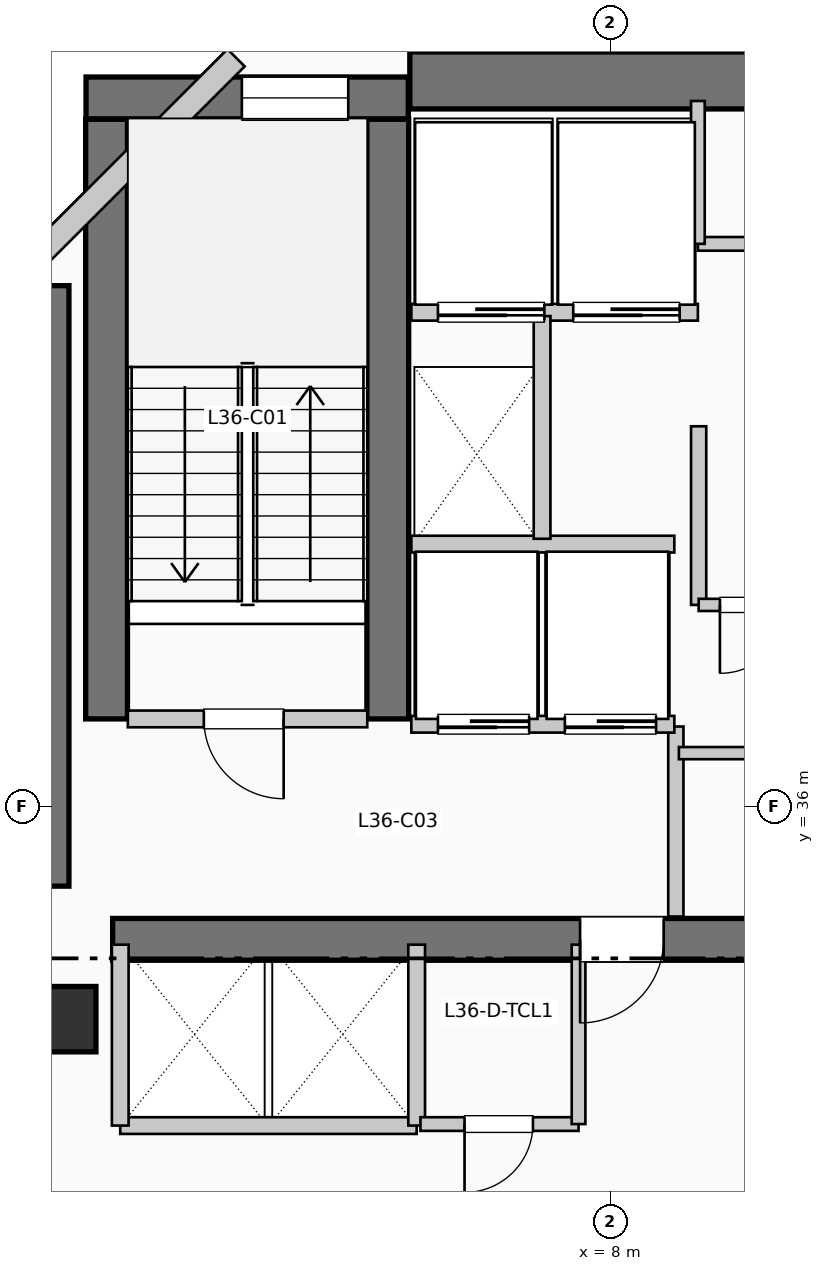
"""IFC4 building model, lengths in metres.
Left out: names, types, materials, properties, quantities, classifications, styles, units other than length and angle.
Written with IfcOpenShell. Run it as: python <this file> out.ifc"""

import sys

from ifc_helpers import new_model, si_unit, direction, frame, frame_2d, origin, origin_2d, place, context, subcontext, project, spatial, rectangle, extrude, element, fill, save


model = new_model("IFC4")
c1 = context("Model", 3, precision=1e-05, world=origin(), true_north=direction((0.0, 1.0)))
c2 = subcontext(c1, "Body", "Model", "MODEL_VIEW")
j1 = project(units=[si_unit("LENGTHUNIT", "METRE"), si_unit("PLANEANGLEUNIT", "RADIAN")], contexts=[c1])
p1 = place(None, origin())
s1 = spatial("IfcSite", under=j1, at=p1, CompositionType="ELEMENT")
p2 = place(p1, origin())
s2 = spatial("IfcBuilding", under=s1, at=p2, CompositionType="ELEMENT")
p3 = place(p2, frame((0.0, 0.0, 150.81)))
s3 = spatial("IfcBuildingStorey", under=s2, at=p3, CompositionType="ELEMENT", Elevation=150.81)
p4 = place(p3, frame((5.36, 45.55, 0.0), z_axis=(0.0, 0.0, 1.0), x_axis=(1.0, 0.0, 0.0)))
e1 = element("IfcWall", 1, at=p4, inside=s3, PredefinedType="SHEAR", context=c2, shape_type="SweptSolid", body=[
    extrude(rectangle(XDim=13.98, YDim=0.75, at=frame_2d((6.99, 0.0))), origin(), (0.0, 0.0, 1.0), 3.96),
])
p5 = place(p3, frame((0.5, 34.95, 0.0), z_axis=(0.0, 0.0, 1.0), x_axis=(0.0, 1.0, 0.0)))
e2 = element("IfcWall", 2, at=p5, inside=s3, PredefinedType="SHEAR", context=c2, shape_type="SweptSolid", body=[
    extrude(rectangle(XDim=7.9, YDim=0.75, at=frame_2d((3.95, 0.0))), origin(), (0.0, 0.0, 1.0), 3.96),
])
p6 = place(p3, frame((1.45, 34.25, 0.0), z_axis=(0.0, 0.0, 1.0), x_axis=(1.0, 0.0, 0.0)))
e3 = element("IfcWall", 3, at=p6, inside=s3, PredefinedType="SHEAR", context=c2, shape_type="SweptSolid", body=[
    extrude(rectangle(XDim=10.71, YDim=0.55, at=frame_2d((5.355, 0.0))), origin(), (0.0, 0.0, 1.0), 3.96),
])
p7 = place(p6, frame((7.25, 0.0, 0.0), z_axis=(0.0, 0.0, 1.0), x_axis=(-1.0, 0.0, 0.0)))
e4 = element("IfcOpeningElement", 4, at=p7, cuts=e3, PredefinedType="OPENING", context=c2, shape_type="SweptSolid", body=[
    extrude(rectangle(XDim=1.1, YDim=2.15, at=frame_2d((0.55, 1.075))), frame((0.0, 0.285, 0.0), z_axis=(0.0, -1.0, 0.0), x_axis=(1.0, 0.0, 0.0)), (0.0, 0.0, 1.0), 0.57),
])
for number, where, z_axis, x_axis in (
    (5, (1.37, 37.15, 0.0), (0.0, 0.0, 1.0), (0.0, 1.0, 0.0)),
    (6, (5.07, 37.15, 0.0), (0.0, 0.0, 1.0), (0.0, 1.0, 0.0)),
):
    element("IfcWall", number, at=place(p3, frame(where, z_axis=z_axis, x_axis=x_axis)), inside=s3, PredefinedType="SHEAR", context=c2, shape_type="SweptSolid", body=[
        extrude(rectangle(XDim=7.89, YDim=0.55, at=frame_2d((3.945, 0.0))), origin(), (0.0, 0.0, 1.0), 3.96),
    ])
p8 = place(p3, frame((1.1, 45.32, 0.0), z_axis=(0.0, 0.0, 1.0), x_axis=(1.0, 0.0, 0.0)))
e7 = element("IfcWall", 7, at=p8, inside=s3, PredefinedType="SHEAR", context=c2, shape_type="SweptSolid", body=[
    extrude(rectangle(XDim=4.24, YDim=0.55, at=frame_2d((2.12, 0.0))), origin(), (0.0, 0.0, 1.0), 3.96),
])
p9 = place(p8, frame((2.05, 0.0, 1.05)))
e8 = element("IfcOpeningElement", 8, at=p9, cuts=e7, PredefinedType="OPENING", context=c2, shape_type="SweptSolid", body=[
    extrude(rectangle(XDim=1.4, YDim=1.8, at=frame_2d((0.7, 0.9))), frame((0.0, 0.285, 0.0), z_axis=(0.0, -1.0, 0.0), x_axis=(1.0, 0.0, 0.0)), (0.0, 0.0, 1.0), 0.57),
])
p10 = place(p3, frame((0.8, 33.2, 0.0), z_axis=(0.0, 0.0, 1.0), x_axis=(1.0, 0.0, 0.0)))
e9 = element("IfcColumn", 9, at=p10, inside=s3, PredefinedType="COLUMN", context=c2, shape_type="SweptSolid", body=[
    extrude(rectangle(XDim=0.86, YDim=0.86, at=origin_2d()), origin(), (0.0, 0.0, 1.0), 3.96),
])
p11 = place(p3, frame((3.074, 45.848, 0.0), z_axis=(0.0, 0.0, 1.0), x_axis=(-0.707106781187, -0.707106781187, 0.0)))
e10 = element("IfcWall", 10, at=p11, inside=s3, PredefinedType="SOLIDWALL", context=c2, shape_type="SweptSolid", body=[
    extrude(rectangle(XDim=4.133, YDim=0.32, at=frame_2d((2.066, 0.0))), origin(), (0.0, 0.0, 1.0), 3.71),
])
p12 = place(p3, frame((1.65, 37.15, 0.0), z_axis=(0.0, 0.0, 1.0), x_axis=(1.0, 0.0, 0.0)))
e11 = element("IfcWall", 11, at=p12, inside=s3, PredefinedType="PARTITIONING", context=c2, shape_type="SweptSolid", body=[
    extrude(rectangle(XDim=3.15, YDim=0.22, at=frame_2d((1.575, 0.0))), origin(), (0.0, 0.0, 1.0), 3.71),
])
p13 = place(p12, frame((2.05, 0.0, 0.0), z_axis=(0.0, 0.0, 1.0), x_axis=(-1.0, 0.0, 0.0)))
e12 = element("IfcOpeningElement", 12, at=p13, cuts=e11, PredefinedType="OPENING", context=c2, shape_type="SweptSolid", body=[
    extrude(rectangle(XDim=1.05, YDim=2.15, at=frame_2d((0.525, 1.075))), frame((0.0, 0.12, 0.0), z_axis=(0.0, -1.0, 0.0), x_axis=(1.0, 0.0, 0.0)), (0.0, 0.0, 1.0), 0.24),
])
p14 = place(p3, frame((8.86, 34.55, 0.0), z_axis=(0.0, 0.0, 1.0), x_axis=(0.0, 1.0, 0.0)))
e13 = element("IfcWall", 13, at=p14, inside=s3, PredefinedType="PARTITIONING", context=c2, shape_type="SweptSolid", body=[
    extrude(rectangle(XDim=2.5, YDim=0.2, at=frame_2d((1.25, 0.0))), origin(), (0.0, 0.0, 1.0), 3.71),
])
p15 = place(p3, frame((5.38, 37.08, 0.0), z_axis=(0.0, 0.0, 1.0), x_axis=(1.0, 0.0, 0.0)))
e14 = element("IfcWall", 14, at=p15, inside=s3, PredefinedType="PARTITIONING", context=c2, shape_type="SweptSolid", body=[
    extrude(rectangle(XDim=3.46, YDim=0.22, at=frame_2d((1.73, 0.0))), origin(), (0.0, 0.0, 1.0), 3.71),
])
p16 = place(p15, frame((1.55, 0.0, 0.0), z_axis=(0.0, 0.0, 1.0), x_axis=(-1.0, 0.0, 0.0)))
e15 = element("IfcOpeningElement", 15, at=p16, cuts=e14, PredefinedType="OPENING", context=c2, shape_type="SweptSolid", body=[
    extrude(rectangle(XDim=1.2, YDim=2.2, at=frame_2d((0.6, 1.1))), frame((0.0, 0.12, 0.0), z_axis=(0.0, -1.0, 0.0), x_axis=(1.0, 0.0, 0.0)), (0.0, 0.0, 1.0), 0.24),
])
p17 = place(p15, frame((3.22, 0.0, 0.0), z_axis=(0.0, 0.0, 1.0), x_axis=(-1.0, 0.0, 0.0)))
e16 = element("IfcOpeningElement", 16, at=p17, cuts=e14, PredefinedType="OPENING", context=c2, shape_type="SweptSolid", body=[
    extrude(rectangle(XDim=1.2, YDim=2.2, at=frame_2d((0.6, 1.1))), frame((0.0, 0.12, 0.0), z_axis=(0.0, -1.0, 0.0), x_axis=(1.0, 0.0, 0.0)), (0.0, 0.0, 1.0), 0.24),
])
p18 = place(p3, frame((5.38, 39.45, 0.0), z_axis=(0.0, 0.0, 1.0), x_axis=(1.0, 0.0, 0.0)))
e17 = element("IfcWall", 17, at=p18, inside=s3, PredefinedType="PARTITIONING", context=c2, shape_type="SweptSolid", body=[
    extrude(rectangle(XDim=3.46, YDim=0.22, at=frame_2d((1.73, 0.0))), origin(), (0.0, 0.0, 1.0), 3.71),
])
p19 = place(p3, frame((5.38, 42.5, 0.0), z_axis=(0.0, 0.0, 1.0), x_axis=(1.0, 0.0, 0.0)))
e18 = element("IfcWall", 18, at=p19, inside=s3, PredefinedType="PARTITIONING", context=c2, shape_type="SweptSolid", body=[
    extrude(rectangle(XDim=3.77, YDim=0.22, at=frame_2d((1.885, 0.0))), origin(), (0.0, 0.0, 1.0), 3.71),
])
p20 = place(p19, frame((1.75, 0.0, 0.0), z_axis=(0.0, 0.0, 1.0), x_axis=(-1.0, 0.0, 0.0)))
e19 = element("IfcOpeningElement", 19, at=p20, cuts=e18, PredefinedType="OPENING", context=c2, shape_type="SweptSolid", body=[
    extrude(rectangle(XDim=1.4, YDim=2.2, at=frame_2d((0.7, 1.1))), frame((0.0, 0.12, 0.0), z_axis=(0.0, -1.0, 0.0), x_axis=(1.0, 0.0, 0.0)), (0.0, 0.0, 1.0), 0.24),
])
p21 = place(p19, frame((3.53, 0.0, 0.0), z_axis=(0.0, 0.0, 1.0), x_axis=(-1.0, 0.0, 0.0)))
e20 = element("IfcOpeningElement", 20, at=p21, cuts=e18, PredefinedType="OPENING", context=c2, shape_type="SweptSolid", body=[
    extrude(rectangle(XDim=1.4, YDim=2.2, at=frame_2d((0.7, 1.1))), frame((0.0, 0.12, 0.0), z_axis=(0.0, -1.0, 0.0), x_axis=(1.0, 0.0, 0.0)), (0.0, 0.0, 1.0), 0.24),
])
p22 = place(p3, frame((7.1, 39.52, 0.0), z_axis=(0.0, 0.0, 1.0), x_axis=(0.0, 1.0, 0.0)))
e21 = element("IfcWall", 21, at=p22, inside=s3, PredefinedType="PARTITIONING", context=c2, shape_type="SweptSolid", body=[
    extrude(rectangle(XDim=2.93, YDim=0.22, at=frame_2d((1.465, 0.0))), origin(), (0.0, 0.0, 1.0), 3.71),
])
p23 = place(p3, frame((1.55, 31.8, 0.0), z_axis=(0.0, 0.0, 1.0), x_axis=(1.0, 0.0, 0.0)))
e22 = element("IfcWall", 22, at=p23, inside=s3, PredefinedType="PARTITIONING", context=c2, shape_type="SweptSolid", body=[
    extrude(rectangle(XDim=3.9, YDim=0.22, at=frame_2d((1.95, 0.0))), origin(), (0.0, 0.0, 1.0), 3.71),
])
for number, where, z_axis, x_axis in (
    (23, (1.55, 31.8, 0.0), (0.0, 0.0, 1.0), (0.0, 1.0, 0.0)),
    (24, (5.45, 31.8, 0.0), (0.0, 0.0, 1.0), (0.0, 1.0, 0.0)),
):
    element("IfcWall", number, at=place(p3, frame(where, z_axis=z_axis, x_axis=x_axis)), inside=s3, PredefinedType="PARTITIONING", context=c2, shape_type="SweptSolid", body=[
        extrude(rectangle(XDim=2.38, YDim=0.22, at=frame_2d((1.19, 0.0))), origin(), (0.0, 0.0, 1.0), 3.71),
    ])
p24 = place(p3, frame((9.16, 38.65, 0.0), z_axis=(0.0, 0.0, 1.0), x_axis=(0.0, 1.0, 0.0)))
e25 = element("IfcWall", 25, at=p24, inside=s3, PredefinedType="PARTITIONING", context=c2, shape_type="SweptSolid", body=[
    extrude(rectangle(XDim=2.35, YDim=0.2, at=frame_2d((1.175, 0.0))), origin(), (0.0, 0.0, 1.0), 3.71),
])
p25 = place(p3, frame((5.5, 31.82, 0.0), z_axis=(0.0, 0.0, 1.0), x_axis=(1.0, 0.0, 0.0)))
e26 = element("IfcWall", 26, at=p25, inside=s3, PredefinedType="PLUMBINGWALL", context=c2, shape_type="SweptSolid", body=[
    extrude(rectangle(XDim=2.08, YDim=0.18, at=frame_2d((1.04, 0.0))), origin(), (0.0, 0.0, 1.0), 3.71),
])
p26 = place(p25, frame((1.48, 0.0, 0.0), z_axis=(0.0, 0.0, 1.0), x_axis=(-1.0, 0.0, 0.0)))
e27 = element("IfcOpeningElement", 27, at=p26, cuts=e26, PredefinedType="OPENING", context=c2, shape_type="SweptSolid", body=[
    extrude(rectangle(XDim=0.9, YDim=2.1, at=frame_2d((0.45, 1.05))), frame((0.0, 0.1, 0.0), z_axis=(0.0, -1.0, 0.0), x_axis=(1.0, 0.0, 0.0)), (0.0, 0.0, 1.0), 0.2),
])
p27 = place(p3, frame((7.58, 31.82, 0.0), z_axis=(0.0, 0.0, 1.0), x_axis=(0.0, 1.0, 0.0)))
e28 = element("IfcWall", 28, at=p27, inside=s3, PredefinedType="PLUMBINGWALL", context=c2, shape_type="SweptSolid", body=[
    extrude(rectangle(XDim=2.36, YDim=0.18, at=frame_2d((1.18, 0.0))), origin(), (0.0, 0.0, 1.0), 3.71),
])
p28 = place(p3, frame((8.9, 36.7, 0.0), z_axis=(0.0, 0.0, 1.0), x_axis=(1.0, 0.0, 0.0)))
e29 = element("IfcWall", 29, at=p28, inside=s3, PredefinedType="PARTITIONING", context=c2, shape_type="SweptSolid", body=[
    extrude(rectangle(XDim=3.25, YDim=0.16, at=frame_2d((1.625, 0.0))), origin(), (0.0, 0.0, 1.0), 3.71),
])
p29 = place(p28, frame((1.1, 0.0, 0.0)))
e30 = element("IfcOpeningElement", 30, at=p29, cuts=e29, PredefinedType="OPENING", context=c2, shape_type="SweptSolid", body=[
    extrude(rectangle(XDim=0.95, YDim=2.15, at=frame_2d((0.475, 1.075))), frame((0.0, 0.09, 0.0), z_axis=(0.0, -1.0, 0.0), x_axis=(1.0, 0.0, 0.0)), (0.0, 0.0, 1.0), 0.18),
])
p30 = place(p3, frame((9.16, 38.65, 0.0), z_axis=(0.0, 0.0, 1.0), x_axis=(1.0, 0.0, 0.0)))
e31 = element("IfcWall", 31, at=p30, inside=s3, PredefinedType="PARTITIONING", context=c2, shape_type="SweptSolid", body=[
    extrude(rectangle(XDim=3.42, YDim=0.16, at=frame_2d((1.71, 0.0))), origin(), (0.0, 0.0, 1.0), 3.71),
])
p31 = place(p30, frame((1.18, 0.0, 0.0), z_axis=(0.0, 0.0, 1.0), x_axis=(-1.0, 0.0, 0.0)))
e32 = element("IfcOpeningElement", 32, at=p31, cuts=e31, PredefinedType="OPENING", context=c2, shape_type="SweptSolid", body=[
    extrude(rectangle(XDim=0.9, YDim=2.15, at=frame_2d((0.45, 1.075))), frame((0.0, 0.09, 0.0), z_axis=(0.0, -1.0, 0.0), x_axis=(1.0, 0.0, 0.0)), (0.0, 0.0, 1.0), 0.18),
])
p32 = place(p30, frame((2.6, 0.0, 0.0), z_axis=(0.0, 0.0, 1.0), x_axis=(-1.0, 0.0, 0.0)))
e33 = element("IfcOpeningElement", 33, at=p32, cuts=e31, PredefinedType="OPENING", context=c2, shape_type="SweptSolid", body=[
    extrude(rectangle(XDim=0.9, YDim=2.15, at=frame_2d((0.45, 1.075))), frame((0.0, 0.09, 0.0), z_axis=(0.0, -1.0, 0.0), x_axis=(1.0, 0.0, 0.0)), (0.0, 0.0, 1.0), 0.18),
])
p33 = place(p3, frame((9.15, 43.4, 0.0), z_axis=(0.0, 0.0, 1.0), x_axis=(1.0, 0.0, 0.0)))
e34 = element("IfcWall", 34, at=p33, inside=s3, PredefinedType="PLUMBINGWALL", context=c2, shape_type="SweptSolid", body=[
    extrude(rectangle(XDim=9.33, YDim=0.18, at=frame_2d((4.665, 0.0))), origin(), (0.0, 0.0, 1.0), 3.71),
])
p34 = place(p33, frame((0.72, 0.0, 0.0)))
e35 = element("IfcOpeningElement", 35, at=p34, cuts=e34, PredefinedType="OPENING", context=c2, shape_type="SweptSolid", body=[
    extrude(rectangle(XDim=0.92, YDim=2.1, at=frame_2d((0.46, 1.05))), frame((0.0, 0.1, 0.0), z_axis=(0.0, -1.0, 0.0), x_axis=(1.0, 0.0, 0.0)), (0.0, 0.0, 1.0), 0.2),
])
p35 = place(p33, frame((3.02, 0.0, 0.0)))
e36 = element("IfcOpeningElement", 36, at=p35, cuts=e34, PredefinedType="OPENING", context=c2, shape_type="SweptSolid", body=[
    extrude(rectangle(XDim=0.92, YDim=2.1, at=frame_2d((0.46, 1.05))), frame((0.0, 0.1, 0.0), z_axis=(0.0, -1.0, 0.0), x_axis=(1.0, 0.0, 0.0)), (0.0, 0.0, 1.0), 0.2),
])
p36 = place(p33, frame((5.34, 0.0, 0.0)))
e37 = element("IfcOpeningElement", 37, at=p36, cuts=e34, PredefinedType="OPENING", context=c2, shape_type="SweptSolid", body=[
    extrude(rectangle(XDim=0.92, YDim=2.1, at=frame_2d((0.46, 1.05))), frame((0.0, 0.1, 0.0), z_axis=(0.0, -1.0, 0.0), x_axis=(1.0, 0.0, 0.0)), (0.0, 0.0, 1.0), 0.2),
])
p37 = place(p33, frame((7.66, 0.0, 0.0)))
e38 = element("IfcOpeningElement", 38, at=p37, cuts=e34, PredefinedType="OPENING", context=c2, shape_type="SweptSolid", body=[
    extrude(rectangle(XDim=0.95, YDim=2.1, at=frame_2d((0.475, 1.05))), frame((0.0, 0.1, 0.0), z_axis=(0.0, -1.0, 0.0), x_axis=(1.0, 0.0, 0.0)), (0.0, 0.0, 1.0), 0.2),
])
p38 = place(p3, frame((9.15, 43.4, 0.0), z_axis=(0.0, 0.0, 1.0), x_axis=(0.0, 1.0, 0.0)))
e39 = element("IfcWall", 39, at=p38, inside=s3, PredefinedType="PLUMBINGWALL", context=c2, shape_type="SweptSolid", body=[
    extrude(rectangle(XDim=1.88, YDim=0.18, at=frame_2d((0.94, 0.0))), origin(), (0.0, 0.0, 1.0), 3.71),
])
p39 = place(p9, origin())
e40 = element("IfcWindow", 40, at=p39, inside=s3, PartitioningType="SINGLE_PANEL", PredefinedType="WINDOW", context=c2, shape_type="SweptSolid", body=[
    extrude(rectangle(XDim=1.4, YDim=1.8, at=frame_2d((0.7, 0.9))), frame((0.0, 0.03, 0.0), z_axis=(0.0, -1.0, 0.0), x_axis=(1.0, 0.0, 0.0)), (0.0, 0.0, 1.0), 0.06),
])
fill(e8, e40)
p40 = place(p13, origin())
e41 = element("IfcDoor", 41, at=p40, inside=s3, OperationType="SINGLE_SWING_RIGHT", PredefinedType="DOOR", context=c2, shape_type="SweptSolid", body=[
    extrude(rectangle(XDim=1.05, YDim=2.15, at=frame_2d((0.525, 1.075))), frame((0.0, 0.025, 0.0), z_axis=(0.0, -1.0, 0.0), x_axis=(1.0, 0.0, 0.0)), (0.0, 0.0, 1.0), 0.05),
])
fill(e12, e41)
p41 = place(p7, origin())
e42 = element("IfcDoor", 42, at=p41, inside=s3, OperationType="SINGLE_SWING_LEFT", PredefinedType="DOOR", context=c2, shape_type="SweptSolid", body=[
    extrude(rectangle(XDim=1.1, YDim=2.15, at=frame_2d((0.55, 1.075))), frame((0.0, 0.025, 0.0), z_axis=(0.0, -1.0, 0.0), x_axis=(1.0, 0.0, 0.0)), (0.0, 0.0, 1.0), 0.05),
])
fill(e4, e42)
p42 = place(p16, origin())
e43 = element("IfcDoor", 43, at=p42, inside=s3, OperationType="SLIDING_TO_RIGHT", PredefinedType="DOOR", context=c2, shape_type="SweptSolid", body=[
    extrude(rectangle(XDim=1.2, YDim=2.2, at=frame_2d((0.6, 1.1))), frame((0.0, 0.025, 0.0), z_axis=(0.0, -1.0, 0.0), x_axis=(1.0, 0.0, 0.0)), (0.0, 0.0, 1.0), 0.05),
])
fill(e15, e43)
p43 = place(p17, origin())
e44 = element("IfcDoor", 44, at=p43, inside=s3, OperationType="SLIDING_TO_RIGHT", PredefinedType="DOOR", context=c2, shape_type="SweptSolid", body=[
    extrude(rectangle(XDim=1.2, YDim=2.2, at=frame_2d((0.6, 1.1))), frame((0.0, 0.025, 0.0), z_axis=(0.0, -1.0, 0.0), x_axis=(1.0, 0.0, 0.0)), (0.0, 0.0, 1.0), 0.05),
])
fill(e16, e44)
p44 = place(p20, origin())
e45 = element("IfcDoor", 45, at=p44, inside=s3, OperationType="SLIDING_TO_LEFT", PredefinedType="DOOR", context=c2, shape_type="SweptSolid", body=[
    extrude(rectangle(XDim=1.4, YDim=2.2, at=frame_2d((0.7, 1.1))), frame((0.0, 0.025, 0.0), z_axis=(0.0, -1.0, 0.0), x_axis=(1.0, 0.0, 0.0)), (0.0, 0.0, 1.0), 0.05),
])
fill(e19, e45)
p45 = place(p21, origin())
e46 = element("IfcDoor", 46, at=p45, inside=s3, OperationType="SLIDING_TO_LEFT", PredefinedType="DOOR", context=c2, shape_type="SweptSolid", body=[
    extrude(rectangle(XDim=1.4, YDim=2.2, at=frame_2d((0.7, 1.1))), frame((0.0, 0.025, 0.0), z_axis=(0.0, -1.0, 0.0), x_axis=(1.0, 0.0, 0.0)), (0.0, 0.0, 1.0), 0.05),
])
fill(e20, e46)
p46 = place(p26, origin())
e47 = element("IfcDoor", 47, at=p46, inside=s3, OperationType="SINGLE_SWING_LEFT", PredefinedType="DOOR", context=c2, shape_type="SweptSolid", body=[
    extrude(rectangle(XDim=0.9, YDim=2.1, at=frame_2d((0.45, 1.05))), frame((0.0, 0.025, 0.0), z_axis=(0.0, -1.0, 0.0), x_axis=(1.0, 0.0, 0.0)), (0.0, 0.0, 1.0), 0.05),
])
fill(e27, e47)
p47 = place(p31, origin())
e48 = element("IfcDoor", 48, at=p47, inside=s3, OperationType="SINGLE_SWING_LEFT", PredefinedType="DOOR", context=c2, shape_type="SweptSolid", body=[
    extrude(rectangle(XDim=0.9, YDim=2.15, at=frame_2d((0.45, 1.075))), frame((0.0, 0.025, 0.0), z_axis=(0.0, -1.0, 0.0), x_axis=(1.0, 0.0, 0.0)), (0.0, 0.0, 1.0), 0.05),
])
fill(e32, e48)
save(model, sys.argv[1])
